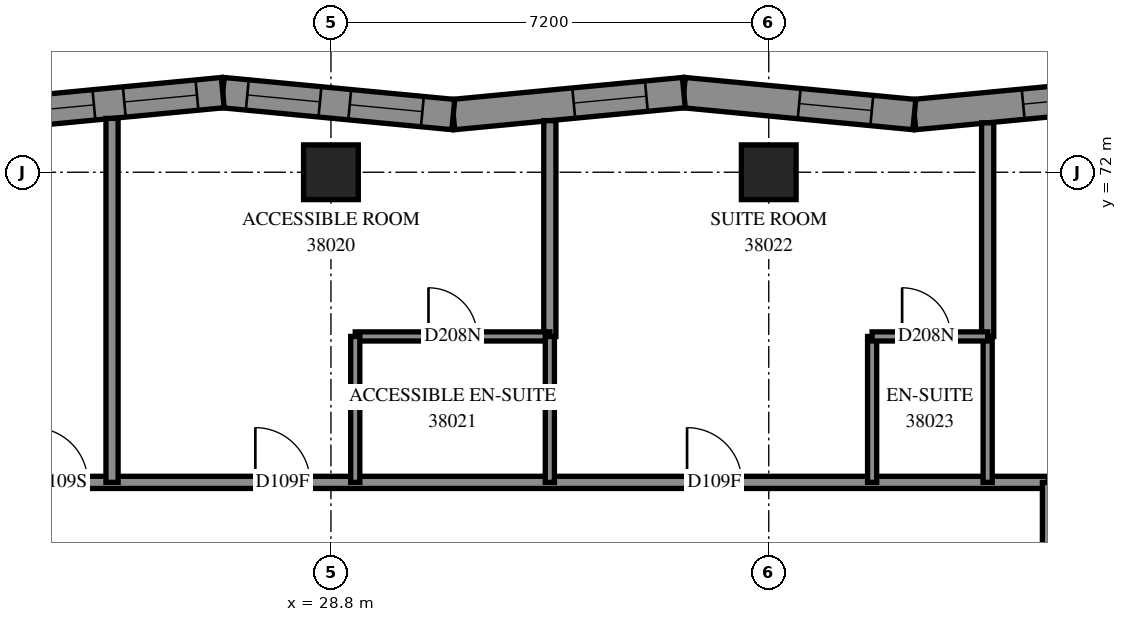
"""IFC4 building model, lengths in metres.
Left out: names, types, materials, properties, quantities, classifications, styles, units other than length and angle.
Written with IfcOpenShell. Run it as: python <this file> out.ifc"""

import sys

from ifc_helpers import new_model, si_unit, direction, frame, frame_2d, origin, origin_2d, place, context, subcontext, project, spatial, polyline, rectangle, outline, extrude, element, fill, save


model = new_model("IFC4")
c1 = context("Model", 3, precision=1e-05, world=origin(), true_north=direction((0.0, 1.0)))
c2 = subcontext(c1, "Body", "Model", "MODEL_VIEW")
j1 = project(units=[si_unit("LENGTHUNIT", "METRE"), si_unit("PLANEANGLEUNIT", "RADIAN")], contexts=[c1])
p1 = place(None, origin())
s1 = spatial("IfcSite", under=j1, at=p1, CompositionType="ELEMENT")
p2 = place(p1, origin())
s2 = spatial("IfcBuilding", under=s1, at=p2, CompositionType="ELEMENT")
p3 = place(p2, frame((0.0, 0.0, 142.2)))
s3 = spatial("IfcBuildingStorey", under=s2, at=p3, CompositionType="ELEMENT", Elevation=142.2)
for number, where, z_axis, x_axis in (
    (1, (28.8, 72.0, 0.0), (0.0, 0.0, 1.0), (1.0, 0.0, 0.0)),
    (2, (36.0, 72.0, 0.0), (0.0, 0.0, 1.0), (1.0, 0.0, 0.0)),
):
    element("IfcColumn", number, at=place(p3, frame(where, z_axis=z_axis, x_axis=x_axis)), inside=s3, PredefinedType="COLUMN", context=c2, shape_type="SweptSolid", body=[
        extrude(rectangle(XDim=0.9, YDim=0.9, at=origin_2d()), origin(), (0.0, 0.0, 1.0), 3.1),
    ])
p4 = place(p3, frame((42.185, 73.31, 0.0), z_axis=(0.0, 0.0, 1.0), x_axis=(-0.9954968887, -0.0947942225, 0.0)))
e3 = element("IfcWall", 3, at=p4, inside=s3, PredefinedType="SOLIDWALL", context=c2, shape_type="SweptSolid", body=[
    extrude(outline(polyline([(-0.024, -0.25), (3.784, -0.25), (3.832, 0.25), (0.024, 0.25), (-0.024, -0.25)])), origin(), (0.0, 0.0, 1.0), 3.1),
])
p5 = place(p4, frame((0.81, 0.0, 0.45)))
e4 = element("IfcOpeningElement", 4, at=p5, cuts=e3, PredefinedType="OPENING", context=c2, shape_type="SweptSolid", body=[
    extrude(rectangle(XDim=1.2, YDim=2.5, at=frame_2d((0.6, 1.25))), frame((0.0, 0.26, 0.0), z_axis=(0.0, -1.0, 0.0), x_axis=(1.0, 0.0, 0.0)), (0.0, 0.0, 1.0), 0.52),
])
p6 = place(p3, frame((38.394, 72.949, 0.0), z_axis=(0.0, 0.0, 1.0), x_axis=(-0.9954966527, 0.0947967005, 0.0)))
e5 = element("IfcWall", 5, at=p6, inside=s3, PredefinedType="SOLIDWALL", context=c2, shape_type="SweptSolid", body=[
    extrude(outline(polyline([(0.024, -0.25), (3.832, -0.25), (3.784, 0.25), (-0.024, 0.25), (0.024, -0.25)])), origin(), (0.0, 0.0, 1.0), 3.1),
])
p7 = place(p6, frame((0.702, 0.0, 0.45)))
e6 = element("IfcOpeningElement", 6, at=p7, cuts=e5, PredefinedType="OPENING", context=c2, shape_type="SweptSolid", body=[
    extrude(rectangle(XDim=1.2, YDim=2.5, at=frame_2d((0.6, 1.25))), frame((0.0, 0.26, 0.0), z_axis=(0.0, -1.0, 0.0), x_axis=(1.0, 0.0, 0.0)), (0.0, 0.0, 1.0), 0.52),
])
p8 = place(p3, frame((34.603, 73.31, 0.0), z_axis=(0.0, 0.0, 1.0), x_axis=(-0.9954966527, -0.0947967005, 0.0)))
e7 = element("IfcWall", 7, at=p8, inside=s3, PredefinedType="SOLIDWALL", context=c2, shape_type="SweptSolid", body=[
    extrude(outline(polyline([(-0.024, -0.25), (3.784, -0.25), (3.832, 0.25), (0.024, 0.25), (-0.024, -0.25)])), origin(), (0.0, 0.0, 1.0), 3.1),
])
p9 = place(p8, frame((0.618, 0.0, 0.45)))
e8 = element("IfcOpeningElement", 8, at=p9, cuts=e7, PredefinedType="OPENING", context=c2, shape_type="SweptSolid", body=[
    extrude(rectangle(XDim=1.2, YDim=2.5, at=frame_2d((0.6, 1.25))), frame((0.0, 0.26, 0.0), z_axis=(0.0, -1.0, 0.0), x_axis=(1.0, 0.0, 0.0)), (0.0, 0.0, 1.0), 0.52),
])
p10 = place(p3, frame((30.812, 72.949, 0.0), z_axis=(0.0, 0.0, 1.0), x_axis=(-0.9954966527, 0.0947967005, 0.0)))
e9 = element("IfcWall", 9, at=p10, inside=s3, PredefinedType="SOLIDWALL", context=c2, shape_type="SweptSolid", body=[
    extrude(outline(polyline([(0.024, -0.25), (3.832, -0.25), (3.784, 0.25), (-0.024, 0.25), (0.024, -0.25)])), origin(), (0.0, 0.0, 1.0), 3.1),
])
p11 = place(p10, frame((0.511, 0.0, 0.45)))
e10 = element("IfcOpeningElement", 10, at=p11, cuts=e9, PredefinedType="OPENING", context=c2, shape_type="SweptSolid", body=[
    extrude(rectangle(XDim=1.2, YDim=2.5, at=frame_2d((0.6, 1.25))), frame((0.0, 0.26, 0.0), z_axis=(0.0, -1.0, 0.0), x_axis=(1.0, 0.0, 0.0)), (0.0, 0.0, 1.0), 0.52),
])
p12 = place(p10, frame((2.203, 0.0, 0.45)))
e11 = element("IfcOpeningElement", 11, at=p12, cuts=e9, PredefinedType="OPENING", context=c2, shape_type="SweptSolid", body=[
    extrude(rectangle(XDim=1.2, YDim=2.5, at=frame_2d((0.6, 1.25))), frame((0.0, 0.26, 0.0), z_axis=(0.0, -1.0, 0.0), x_axis=(1.0, 0.0, 0.0)), (0.0, 0.0, 1.0), 0.52),
])
p13 = place(p3, frame((27.021, 73.31, 0.0), z_axis=(0.0, 0.0, 1.0), x_axis=(-0.9954953552, -0.0948103255, 0.0)))
e12 = element("IfcWall", 12, at=p13, inside=s3, PredefinedType="SOLIDWALL", context=c2, shape_type="SweptSolid", body=[
    extrude(outline(polyline([(-0.024, -0.25), (3.784, -0.25), (3.871, 0.25), (0.024, 0.25), (-0.024, -0.25)])), origin(), (0.0, 0.0, 1.0), 3.1),
])
p14 = place(p13, frame((0.426, 0.0, 0.45)))
e13 = element("IfcOpeningElement", 13, at=p14, cuts=e12, PredefinedType="OPENING", context=c2, shape_type="SweptSolid", body=[
    extrude(rectangle(XDim=1.2, YDim=2.5, at=frame_2d((0.6, 1.25))), frame((0.0, 0.26, 0.0), z_axis=(0.0, -1.0, 0.0), x_axis=(1.0, 0.0, 0.0)), (0.0, 0.0, 1.0), 0.52),
])
p15 = place(p13, frame((2.128, 0.0, 0.45)))
e14 = element("IfcOpeningElement", 14, at=p15, cuts=e12, PredefinedType="OPENING", context=c2, shape_type="SweptSolid", body=[
    extrude(rectangle(XDim=1.2, YDim=2.5, at=frame_2d((0.6, 1.25))), frame((0.0, 0.26, 0.0), z_axis=(0.0, -1.0, 0.0), x_axis=(1.0, 0.0, 0.0)), (0.0, 0.0, 1.0), 0.52),
])
p16 = place(p3, frame((21.6, 66.9, 0.0), z_axis=(0.0, 0.0, 1.0), x_axis=(1.0, 0.0, 0.0)))
e15 = element("IfcWall", 15, at=p16, inside=s3, PredefinedType="PARTITIONING", context=c2, shape_type="SweptSolid", body=[
    extrude(rectangle(XDim=19.0, YDim=0.2, at=frame_2d((9.5, 0.0))), origin(), (0.0, 0.0, 1.0), 3.1),
])
p17 = place(p16, frame((2.3, 0.0, 0.0)))
e16 = element("IfcOpeningElement", 16, at=p17, cuts=e15, PredefinedType="OPENING", context=c2, shape_type="SweptSolid", body=[
    extrude(rectangle(XDim=0.9, YDim=2.1, at=frame_2d((0.45, 1.05))), frame((0.0, 0.11, 0.0), z_axis=(0.0, -1.0, 0.0), x_axis=(1.0, 0.0, 0.0)), (0.0, 0.0, 1.0), 0.22),
])
p18 = place(p16, frame((5.957, 0.0, 0.0)))
e17 = element("IfcOpeningElement", 17, at=p18, cuts=e15, PredefinedType="OPENING", context=c2, shape_type="SweptSolid", body=[
    extrude(rectangle(XDim=0.9, YDim=2.1, at=frame_2d((0.45, 1.05))), frame((0.0, 0.11, 0.0), z_axis=(0.0, -1.0, 0.0), x_axis=(1.0, 0.0, 0.0)), (0.0, 0.0, 1.0), 0.22),
])
p19 = place(p16, frame((13.057, 0.0, 0.0)))
e18 = element("IfcOpeningElement", 18, at=p19, cuts=e15, PredefinedType="OPENING", context=c2, shape_type="SweptSolid", body=[
    extrude(rectangle(XDim=0.9, YDim=2.1, at=frame_2d((0.45, 1.05))), frame((0.0, 0.11, 0.0), z_axis=(0.0, -1.0, 0.0), x_axis=(1.0, 0.0, 0.0)), (0.0, 0.0, 1.0), 0.22),
])
p20 = place(p3, frame((25.2, 66.9, 0.0), z_axis=(0.0, 0.0, 1.0), x_axis=(0.0, 1.0, 0.0)))
e19 = element("IfcWall", 19, at=p20, inside=s3, PredefinedType="PARTITIONING", context=c2, shape_type="SweptSolid", body=[
    extrude(rectangle(XDim=5.985, YDim=0.2, at=frame_2d((2.993, 0.0))), origin(), (0.0, 0.0, 1.0), 3.1),
])
p21 = place(p3, frame((40.6, 62.202, 0.0), z_axis=(0.0, 0.0, 1.0), x_axis=(0.0, 1.0, 0.0)))
e20 = element("IfcWall", 20, at=p21, inside=s3, PredefinedType="PARTITIONING", context=c2, shape_type="SweptSolid", body=[
    extrude(rectangle(XDim=4.696, YDim=0.2, at=frame_2d((2.348, 0.0))), origin(), (0.0, 0.0, 1.0), 3.1),
])
p22 = place(p3, frame((32.4, 69.3, 0.0), z_axis=(0.0, 0.0, 1.0), x_axis=(0.0, 1.0, 0.0)))
e21 = element("IfcWall", 21, at=p22, inside=s3, PredefinedType="PARTITIONING", context=c2, shape_type="SweptSolid", body=[
    extrude(rectangle(XDim=3.549, YDim=0.2, at=frame_2d((1.774, 0.0))), origin(), (0.0, 0.0, 1.0), 3.1),
])
p23 = place(p3, frame((39.6, 69.3, 0.0), z_axis=(0.0, 0.0, 1.0), x_axis=(0.0, 1.0, 0.0)))
e22 = element("IfcWall", 22, at=p23, inside=s3, PredefinedType="PARTITIONING", context=c2, shape_type="SweptSolid", body=[
    extrude(rectangle(XDim=3.513, YDim=0.2, at=frame_2d((1.756, 0.0))), origin(), (0.0, 0.0, 1.0), 3.1),
])
p24 = place(p3, frame((29.2, 69.3, 0.0), z_axis=(0.0, 0.0, 1.0), x_axis=(1.0, 0.0, 0.0)))
e23 = element("IfcWall", 23, at=p24, inside=s3, PredefinedType="PARTITIONING", context=c2, shape_type="SweptSolid", body=[
    extrude(rectangle(XDim=3.2, YDim=0.15, at=frame_2d((1.6, 0.0))), origin(), (0.0, 0.0, 1.0), 3.1),
])
p25 = place(p24, frame((1.204, 0.0, 0.0)))
e24 = element("IfcOpeningElement", 24, at=p25, cuts=e23, PredefinedType="OPENING", context=c2, shape_type="SweptSolid", body=[
    extrude(rectangle(XDim=0.8, YDim=2.1, at=frame_2d((0.4, 1.05))), frame((0.0, 0.085, 0.0), z_axis=(0.0, -1.0, 0.0), x_axis=(1.0, 0.0, 0.0)), (0.0, 0.0, 1.0), 0.17),
])
for number, where, z_axis, x_axis in (
    (25, (29.2, 66.9, 0.0), (0.0, 0.0, 1.0), (0.0, 1.0, 0.0)),
    (26, (32.4, 66.9, 0.0), (0.0, 0.0, 1.0), (0.0, 1.0, 0.0)),
    (27, (37.7, 66.9, 0.0), (0.0, 0.0, 1.0), (0.0, 1.0, 0.0)),
    (28, (39.6, 66.9, 0.0), (0.0, 0.0, 1.0), (0.0, 1.0, 0.0)),
):
    element("IfcWall", number, at=place(p3, frame(where, z_axis=z_axis, x_axis=x_axis)), inside=s3, PredefinedType="PARTITIONING", context=c2, shape_type="SweptSolid", body=[
        extrude(rectangle(XDim=2.4, YDim=0.15, at=frame_2d((1.2, 0.0))), origin(), (0.0, 0.0, 1.0), 3.1),
    ])
p26 = place(p3, frame((37.7, 69.3, 0.0), z_axis=(0.0, 0.0, 1.0), x_axis=(1.0, 0.0, 0.0)))
e29 = element("IfcWall", 29, at=p26, inside=s3, PredefinedType="PARTITIONING", context=c2, shape_type="SweptSolid", body=[
    extrude(rectangle(XDim=1.9, YDim=0.15, at=frame_2d((0.95, 0.0))), origin(), (0.0, 0.0, 1.0), 3.1),
])
p27 = place(p26, frame((0.493, 0.0, 0.0)))
e30 = element("IfcOpeningElement", 30, at=p27, cuts=e29, PredefinedType="OPENING", context=c2, shape_type="SweptSolid", body=[
    extrude(rectangle(XDim=0.8, YDim=2.1, at=frame_2d((0.4, 1.05))), frame((0.0, 0.085, 0.0), z_axis=(0.0, -1.0, 0.0), x_axis=(1.0, 0.0, 0.0)), (0.0, 0.0, 1.0), 0.17),
])
p28 = place(p5, origin())
e31 = element("IfcWindow", 31, at=p28, inside=s3, PartitioningType="SINGLE_PANEL", PredefinedType="WINDOW", context=c2, shape_type="SweptSolid", body=[
    extrude(rectangle(XDim=1.2, YDim=2.5, at=frame_2d((0.6, 1.25))), frame((0.0, 0.18, 0.0), z_axis=(0.0, -1.0, 0.0), x_axis=(1.0, 0.0, 0.0)), (0.0, 0.0, 1.0), 0.06),
])
fill(e4, e31)
p29 = place(p7, origin())
e32 = element("IfcWindow", 32, at=p29, inside=s3, PartitioningType="SINGLE_PANEL", PredefinedType="WINDOW", context=c2, shape_type="SweptSolid", body=[
    extrude(rectangle(XDim=1.2, YDim=2.5, at=frame_2d((0.6, 1.25))), frame((0.0, 0.18, 0.0), z_axis=(0.0, -1.0, 0.0), x_axis=(1.0, 0.0, 0.0)), (0.0, 0.0, 1.0), 0.06),
])
fill(e6, e32)
p30 = place(p9, origin())
e33 = element("IfcWindow", 33, at=p30, inside=s3, PartitioningType="SINGLE_PANEL", PredefinedType="WINDOW", context=c2, shape_type="SweptSolid", body=[
    extrude(rectangle(XDim=1.2, YDim=2.5, at=frame_2d((0.6, 1.25))), frame((0.0, 0.18, 0.0), z_axis=(0.0, -1.0, 0.0), x_axis=(1.0, 0.0, 0.0)), (0.0, 0.0, 1.0), 0.06),
])
fill(e8, e33)
p31 = place(p11, origin())
e34 = element("IfcWindow", 34, at=p31, inside=s3, PartitioningType="SINGLE_PANEL", PredefinedType="WINDOW", context=c2, shape_type="SweptSolid", body=[
    extrude(rectangle(XDim=1.2, YDim=2.5, at=frame_2d((0.6, 1.25))), frame((0.0, 0.18, 0.0), z_axis=(0.0, -1.0, 0.0), x_axis=(1.0, 0.0, 0.0)), (0.0, 0.0, 1.0), 0.06),
])
fill(e10, e34)
p32 = place(p12, origin())
e35 = element("IfcWindow", 35, at=p32, inside=s3, PartitioningType="SINGLE_PANEL", PredefinedType="WINDOW", context=c2, shape_type="SweptSolid", body=[
    extrude(rectangle(XDim=1.2, YDim=2.5, at=frame_2d((0.6, 1.25))), frame((0.0, 0.18, 0.0), z_axis=(0.0, -1.0, 0.0), x_axis=(1.0, 0.0, 0.0)), (0.0, 0.0, 1.0), 0.06),
])
fill(e11, e35)
p33 = place(p14, origin())
e36 = element("IfcWindow", 36, at=p33, inside=s3, PartitioningType="SINGLE_PANEL", PredefinedType="WINDOW", context=c2, shape_type="SweptSolid", body=[
    extrude(rectangle(XDim=1.2, YDim=2.5, at=frame_2d((0.6, 1.25))), frame((0.0, 0.18, 0.0), z_axis=(0.0, -1.0, 0.0), x_axis=(1.0, 0.0, 0.0)), (0.0, 0.0, 1.0), 0.06),
])
fill(e13, e36)
p34 = place(p15, origin())
e37 = element("IfcWindow", 37, at=p34, inside=s3, PartitioningType="SINGLE_PANEL", PredefinedType="WINDOW", context=c2, shape_type="SweptSolid", body=[
    extrude(rectangle(XDim=1.2, YDim=2.5, at=frame_2d((0.6, 1.25))), frame((0.0, 0.18, 0.0), z_axis=(0.0, -1.0, 0.0), x_axis=(1.0, 0.0, 0.0)), (0.0, 0.0, 1.0), 0.06),
])
fill(e14, e37)
p35 = place(p17, origin())
e38 = element("IfcDoor", 38, at=p35, inside=s3, OperationType="SINGLE_SWING_RIGHT", PredefinedType="DOOR", context=c2, shape_type="SweptSolid", body=[
    extrude(rectangle(XDim=0.9, YDim=2.1, at=frame_2d((0.45, 1.05))), frame((0.0, 0.025, 0.0), z_axis=(0.0, -1.0, 0.0), x_axis=(1.0, 0.0, 0.0)), (0.0, 0.0, 1.0), 0.05),
])
fill(e16, e38)
p36 = place(p18, origin())
e39 = element("IfcDoor", 39, at=p36, inside=s3, OperationType="SINGLE_SWING_LEFT", PredefinedType="DOOR", context=c2, shape_type="SweptSolid", body=[
    extrude(rectangle(XDim=0.9, YDim=2.1, at=frame_2d((0.45, 1.05))), frame((0.0, 0.025, 0.0), z_axis=(0.0, -1.0, 0.0), x_axis=(1.0, 0.0, 0.0)), (0.0, 0.0, 1.0), 0.05),
])
fill(e17, e39)
p37 = place(p25, origin())
e40 = element("IfcDoor", 40, at=p37, inside=s3, OperationType="SINGLE_SWING_RIGHT", PredefinedType="DOOR", context=c2, shape_type="SweptSolid", body=[
    extrude(rectangle(XDim=0.8, YDim=2.1, at=frame_2d((0.4, 1.05))), frame((0.0, 0.025, 0.0), z_axis=(0.0, -1.0, 0.0), x_axis=(1.0, 0.0, 0.0)), (0.0, 0.0, 1.0), 0.05),
])
fill(e24, e40)
p38 = place(p19, origin())
e41 = element("IfcDoor", 41, at=p38, inside=s3, OperationType="SINGLE_SWING_LEFT", PredefinedType="DOOR", context=c2, shape_type="SweptSolid", body=[
    extrude(rectangle(XDim=0.9, YDim=2.1, at=frame_2d((0.45, 1.05))), frame((0.0, 0.025, 0.0), z_axis=(0.0, -1.0, 0.0), x_axis=(1.0, 0.0, 0.0)), (0.0, 0.0, 1.0), 0.05),
])
fill(e18, e41)
p39 = place(p27, origin())
e42 = element("IfcDoor", 42, at=p39, inside=s3, OperationType="SINGLE_SWING_RIGHT", PredefinedType="DOOR", context=c2, shape_type="SweptSolid", body=[
    extrude(rectangle(XDim=0.8, YDim=2.1, at=frame_2d((0.4, 1.05))), frame((0.0, 0.025, 0.0), z_axis=(0.0, -1.0, 0.0), x_axis=(1.0, 0.0, 0.0)), (0.0, 0.0, 1.0), 0.05),
])
fill(e30, e42)
save(model, sys.argv[1])
